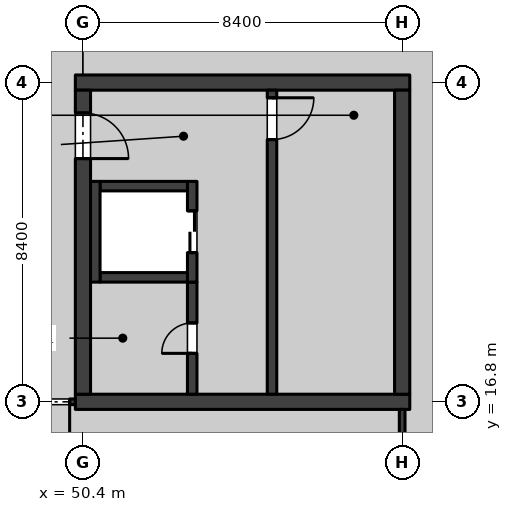
"""IFC4 building model, lengths in metres.
Left out: names, types, materials, properties, quantities, classifications, styles, units other than length and angle.
Written with IfcOpenShell. Run it as: python <this file> out.ifc"""

import sys

from ifc_helpers import new_model, si_unit, direction, frame, frame_2d, origin, place, context, subcontext, project, spatial, rectangle, extrude, element, fill, save


model = new_model("IFC4")
c1 = context("Model", 3, precision=1e-05, world=origin(), true_north=direction((0.0, 1.0)))
c2 = subcontext(c1, "Body", "Model", "MODEL_VIEW")
j1 = project(units=[si_unit("LENGTHUNIT", "METRE"), si_unit("PLANEANGLEUNIT", "RADIAN")], contexts=[c1])
p1 = place(None, origin())
s1 = spatial("IfcSite", under=j1, at=p1, CompositionType="ELEMENT")
p2 = place(p1, origin())
s2 = spatial("IfcBuilding", under=s1, at=p2, CompositionType="ELEMENT")
p3 = place(p2, frame((0.0, 0.0, -4.5)))
s3 = spatial("IfcBuildingStorey", under=s2, at=p3, CompositionType="ELEMENT", Elevation=-4.5)
for number, where, z_axis, x_axis in (
    (1, (50.2, 16.8, 0.0), (0.0, 0.0, 1.0), (1.0, 0.0, 0.0)),
    (2, (50.2, 25.2, 0.0), (0.0, 0.0, 1.0), (1.0, 0.0, 0.0)),
):
    element("IfcWall", number, at=place(p3, frame(where, z_axis=z_axis, x_axis=x_axis)), inside=s3, PredefinedType="SHEAR", context=c2, shape_type="SweptSolid", body=[
        extrude(rectangle(XDim=8.8, YDim=0.4, at=frame_2d((4.4, 0.0))), origin(), (0.0, 0.0, 1.0), 4.05),
    ])
p4 = place(p3, frame((50.4, 17.0, 0.0), z_axis=(0.0, 0.0, 1.0), x_axis=(0.0, 1.0, 0.0)))
e3 = element("IfcWall", 3, at=p4, inside=s3, PredefinedType="SHEAR", context=c2, shape_type="SweptSolid", body=[
    extrude(rectangle(XDim=8.0, YDim=0.4, at=frame_2d((4.0, 0.0))), origin(), (0.0, 0.0, 1.0), 4.05),
])
p5 = place(p4, frame((6.2, 0.0, 0.0)))
e4 = element("IfcOpeningElement", 4, at=p5, cuts=e3, PredefinedType="OPENING", context=c2, shape_type="SweptSolid", body=[
    extrude(rectangle(XDim=1.2, YDim=2.1, at=frame_2d((0.6, 1.05))), frame((0.0, 0.21, 0.0), z_axis=(0.0, -1.0, 0.0), x_axis=(1.0, 0.0, 0.0)), (0.0, 0.0, 1.0), 0.42),
])
p6 = place(p3, frame((58.8, 17.0, 0.0), z_axis=(0.0, 0.0, 1.0), x_axis=(0.0, 1.0, 0.0)))
e5 = element("IfcWall", 5, at=p6, inside=s3, PredefinedType="SHEAR", context=c2, shape_type="SweptSolid", body=[
    extrude(rectangle(XDim=8.0, YDim=0.4, at=frame_2d((4.0, 0.0))), origin(), (0.0, 0.0, 1.0), 4.05),
])
p7 = place(p3, frame((55.375, 25.0, 0.0), z_axis=(0.0, 0.0, 1.0), x_axis=(0.0, -1.0, 0.0)))
e6 = element("IfcWall", 6, at=p7, inside=s3, PredefinedType="SOLIDWALL", context=c2, shape_type="SweptSolid", body=[
    extrude(rectangle(XDim=8.0, YDim=0.25, at=frame_2d((4.0, 0.0))), origin(), (0.0, 0.0, 1.0), 4.05),
])
p8 = place(p7, frame((0.2, 0.0, 0.0)))
e7 = element("IfcOpeningElement", 7, at=p8, cuts=e6, PredefinedType="OPENING", context=c2, shape_type="SweptSolid", body=[
    extrude(rectangle(XDim=1.1, YDim=2.1, at=frame_2d((0.55, 1.05))), frame((0.0, 0.135, 0.0), z_axis=(0.0, -1.0, 0.0), x_axis=(1.0, 0.0, 0.0)), (0.0, 0.0, 1.0), 0.27),
])
p9 = place(p3, frame((53.275, 19.95, 0.0), z_axis=(0.0, 0.0, 1.0), x_axis=(0.0, -1.0, 0.0)))
e8 = element("IfcWall", 8, at=p9, inside=s3, PredefinedType="SOLIDWALL", context=c2, shape_type="SweptSolid", body=[
    extrude(rectangle(XDim=2.95, YDim=0.25, at=frame_2d((1.475, 0.0))), origin(), (0.0, 0.0, 1.0), 4.05),
])
p10 = place(p9, frame((1.075, 0.0, 0.0)))
e9 = element("IfcOpeningElement", 9, at=p10, cuts=e8, PredefinedType="OPENING", context=c2, shape_type="SweptSolid", body=[
    extrude(rectangle(XDim=0.8, YDim=2.1, at=frame_2d((0.4, 1.05))), frame((0.0, 0.135, 0.0), z_axis=(0.0, -1.0, 0.0), x_axis=(1.0, 0.0, 0.0)), (0.0, 0.0, 1.0), 0.27),
])
p11 = place(p3, frame((53.275, 19.95, 0.0), z_axis=(0.0, 0.0, 1.0), x_axis=(0.0, 1.0, 0.0)))
e10 = element("IfcWall", 10, at=p11, inside=s3, PredefinedType="SOLIDWALL", context=c2, shape_type="SweptSolid", body=[
    extrude(rectangle(XDim=2.65, YDim=0.25, at=frame_2d((1.325, 0.0))), origin(), (0.0, 0.0, 1.0), 4.05),
])
p12 = place(p11, frame((0.775, 0.0, 0.0)))
e11 = element("IfcOpeningElement", 11, at=p12, cuts=e10, PredefinedType="OPENING", context=c2, shape_type="SweptSolid", body=[
    extrude(rectangle(XDim=1.1, YDim=2.1, at=frame_2d((0.55, 1.05))), frame((0.0, 0.135, 0.0), z_axis=(0.0, -1.0, 0.0), x_axis=(1.0, 0.0, 0.0)), (0.0, 0.0, 1.0), 0.27),
])
for number, where, z_axis, x_axis in (
    (12, (50.85, 22.475, 0.0), (0.0, 0.0, 1.0), (1.0, 0.0, 0.0)),
    (13, (50.85, 20.075, 0.0), (0.0, 0.0, 1.0), (1.0, 0.0, 0.0)),
):
    element("IfcWall", number, at=place(p3, frame(where, z_axis=z_axis, x_axis=x_axis)), inside=s3, PredefinedType="SOLIDWALL", context=c2, shape_type="SweptSolid", body=[
        extrude(rectangle(XDim=2.3, YDim=0.25, at=frame_2d((1.15, 0.0))), origin(), (0.0, 0.0, 1.0), 4.05),
    ])
p13 = place(p3, frame((50.725, 19.95, 0.0), z_axis=(0.0, 0.0, 1.0), x_axis=(0.0, 1.0, 0.0)))
e14 = element("IfcWall", 14, at=p13, inside=s3, PredefinedType="SOLIDWALL", context=c2, shape_type="SweptSolid", body=[
    extrude(rectangle(XDim=2.65, YDim=0.25, at=frame_2d((1.325, 0.0))), origin(), (0.0, 0.0, 1.0), 4.05),
])
p14 = place(p3, frame((46.2, 16.8, 0.0), z_axis=(0.0, 0.0, 1.0), x_axis=(1.0, 0.0, 0.0)))
e15 = element("IfcWall", 15, at=p14, inside=s3, PredefinedType="PARTITIONING", context=c2, shape_type="SweptSolid", body=[
    extrude(rectangle(XDim=4.0, YDim=0.15, at=frame_2d((2.0, 0.0))), origin(), (0.0, 0.0, 1.0), 4.05),
])
p15 = place(p14, frame((2.65, 0.0, 0.0)))
e16 = element("IfcOpeningElement", 16, at=p15, cuts=e15, PredefinedType="OPENING", context=c2, shape_type="SweptSolid", body=[
    extrude(rectangle(XDim=1.2, YDim=2.1, at=frame_2d((0.6, 1.05))), frame((0.0, 0.085, 0.0), z_axis=(0.0, -1.0, 0.0), x_axis=(1.0, 0.0, 0.0)), (0.0, 0.0, 1.0), 0.17),
])
p16 = place(p3, frame((58.8, 8.8, 0.0), z_axis=(0.0, 0.0, 1.0), x_axis=(0.0, 1.0, 0.0)))
e17 = element("IfcWall", 17, at=p16, inside=s3, PredefinedType="PARTITIONING", context=c2, shape_type="SweptSolid", body=[
    extrude(rectangle(XDim=7.8, YDim=0.15, at=frame_2d((3.9, 0.0))), origin(), (0.0, 0.0, 1.0), 4.05),
])
p17 = place(p5, frame((1.2, 0.0, 0.0), z_axis=(0.0, 0.0, 1.0), x_axis=(-1.0, 0.0, 0.0)))
e18 = element("IfcDoor", 18, at=p17, inside=s3, OperationType="SINGLE_SWING_LEFT", PredefinedType="DOOR", context=c2, shape_type="SweptSolid", body=[
    extrude(rectangle(XDim=1.2, YDim=2.1, at=frame_2d((0.6, 1.05))), frame((0.0, 0.035, 0.0), z_axis=(0.0, -1.0, 0.0), x_axis=(1.0, 0.0, 0.0)), (0.0, 0.0, 1.0), 0.07),
])
fill(e4, e18)
p18 = place(p10, frame((0.8, 0.0, 0.0), z_axis=(0.0, 0.0, 1.0), x_axis=(-1.0, 0.0, 0.0)))
e19 = element("IfcDoor", 19, at=p18, inside=s3, OperationType="SINGLE_SWING_RIGHT", PredefinedType="DOOR", context=c2, shape_type="SweptSolid", body=[
    extrude(rectangle(XDim=0.8, YDim=2.1, at=frame_2d((0.4, 1.05))), frame((0.0, 0.035, 0.0), z_axis=(0.0, -1.0, 0.0), x_axis=(1.0, 0.0, 0.0)), (0.0, 0.0, 1.0), 0.07),
])
fill(e9, e19)
p19 = place(p8, origin())
e20 = element("IfcDoor", 20, at=p19, inside=s3, OperationType="SINGLE_SWING_RIGHT", PredefinedType="DOOR", context=c2, shape_type="SweptSolid", body=[
    extrude(rectangle(XDim=1.1, YDim=2.1, at=frame_2d((0.55, 1.05))), frame((0.0, 0.035, 0.0), z_axis=(0.0, -1.0, 0.0), x_axis=(1.0, 0.0, 0.0)), (0.0, 0.0, 1.0), 0.07),
])
fill(e7, e20)
p20 = place(p12, origin())
e21 = element("IfcDoor", 21, at=p20, inside=s3, OperationType="DOUBLE_DOOR_SLIDING", PredefinedType="DOOR", context=c2, shape_type="SweptSolid", body=[
    extrude(rectangle(XDim=1.1, YDim=2.1, at=frame_2d((0.55, 1.05))), frame((0.0, 0.04, 0.0), z_axis=(0.0, -1.0, 0.0), x_axis=(1.0, 0.0, 0.0)), (0.0, 0.0, 1.0), 0.08),
])
fill(e11, e21)
p21 = place(p15, frame((1.2, 0.0, 0.0), z_axis=(0.0, 0.0, 1.0), x_axis=(-1.0, 0.0, 0.0)))
e22 = element("IfcDoor", 22, at=p21, inside=s3, OperationType="SINGLE_SWING_RIGHT", PredefinedType="DOOR", context=c2, shape_type="SweptSolid", body=[
    extrude(rectangle(XDim=1.2, YDim=2.1, at=frame_2d((0.6, 1.05))), frame((0.0, 0.03, 0.0), z_axis=(0.0, -1.0, 0.0), x_axis=(1.0, 0.0, 0.0)), (0.0, 0.0, 1.0), 0.06),
])
fill(e16, e22)
save(model, sys.argv[1])
